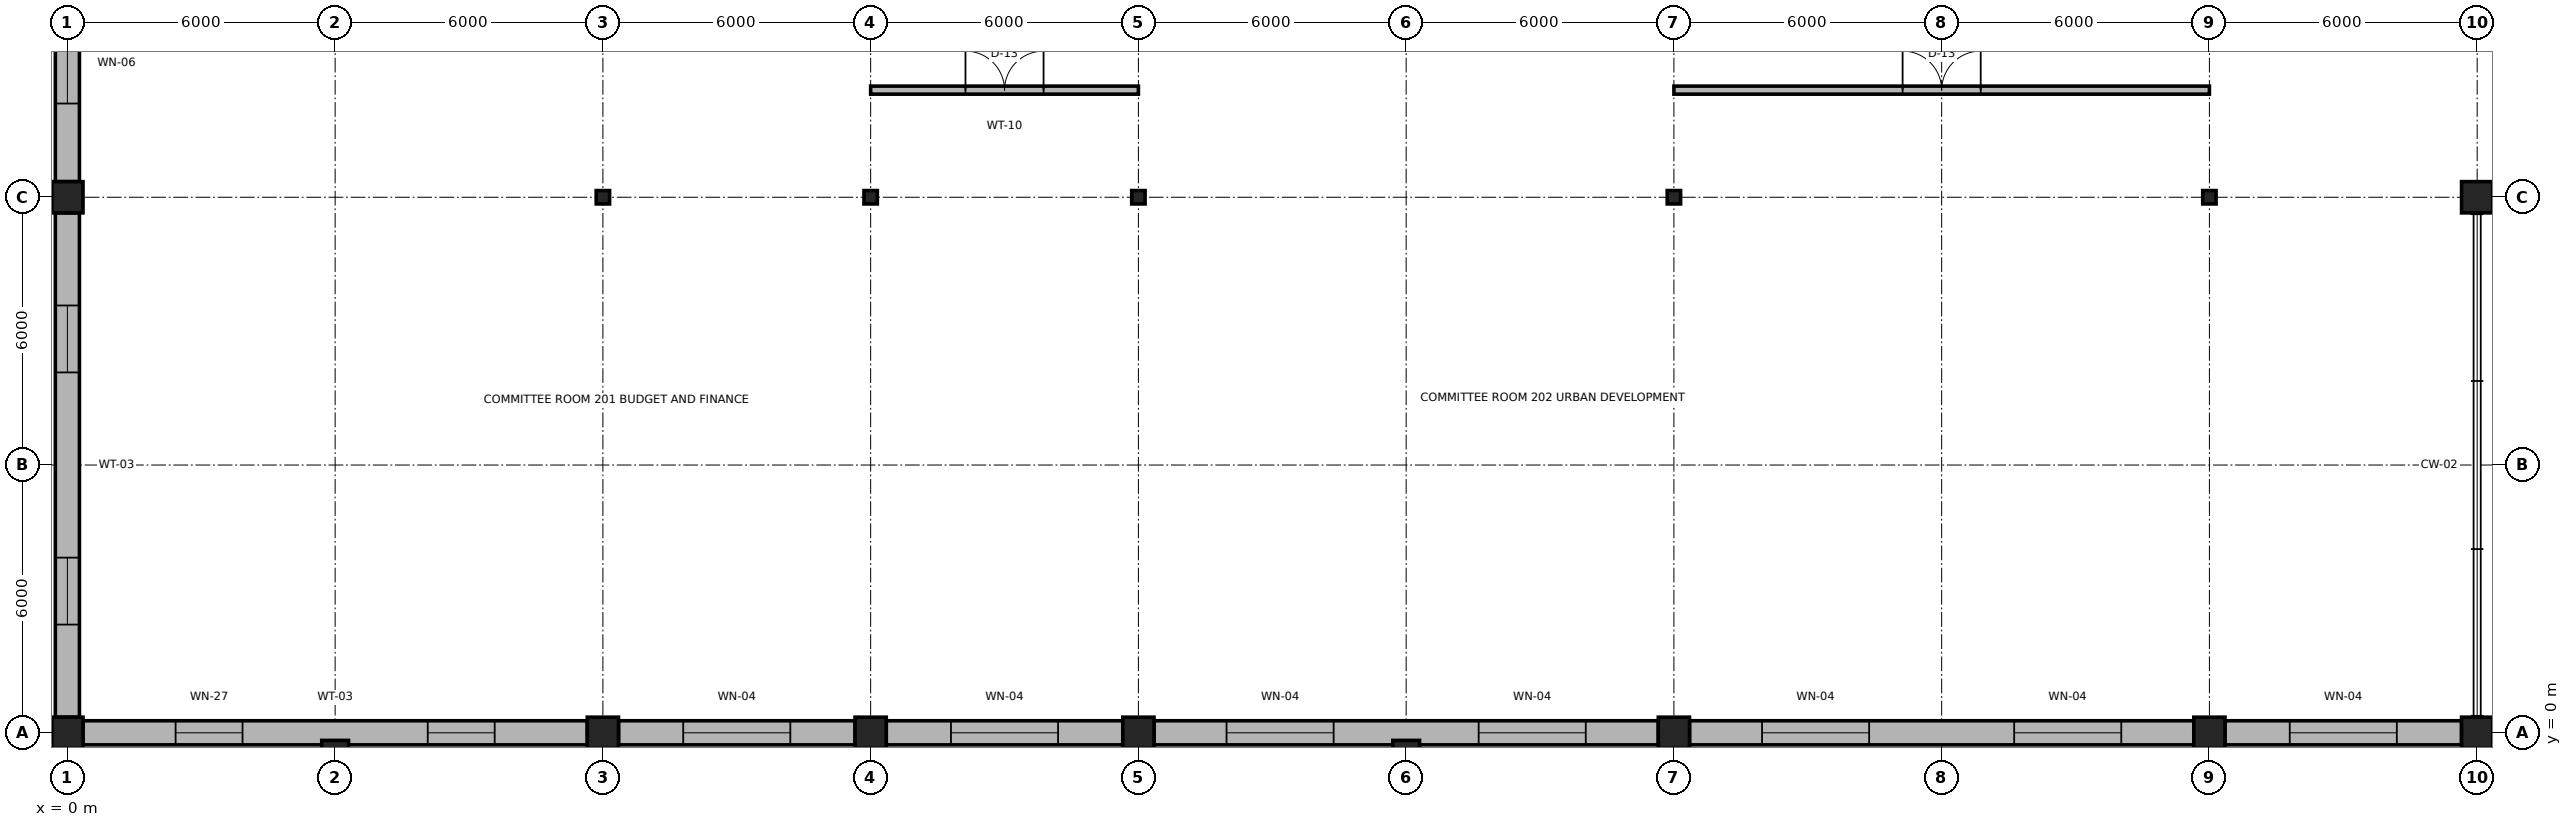
"""IFC4 building model, lengths in metres.
Left out: names, types, materials, properties, quantities, classifications, styles, units other than length and angle.
Written with IfcOpenShell. Run it as: python <this file> out.ifc"""

import sys

from ifc_helpers import new_model, si_unit, direction, frame, frame_2d, origin, origin_2d, place, context, subcontext, project, spatial, rectangle, i_section, extrude, element, fill, save


model = new_model("IFC4")
c1 = context("Model", 3, precision=1e-05, world=origin(), true_north=direction((0.0, 1.0)))
c2 = subcontext(c1, "Body", "Model", "MODEL_VIEW")
j1 = project(units=[si_unit("LENGTHUNIT", "METRE"), si_unit("PLANEANGLEUNIT", "RADIAN")], contexts=[c1])
p1 = place(None, origin())
s1 = spatial("IfcSite", under=j1, at=p1, CompositionType="ELEMENT")
p2 = place(p1, origin())
s2 = spatial("IfcBuilding", under=s1, at=p2, CompositionType="ELEMENT")
p3 = place(p2, frame((0.0, 0.0, 6.0)))
s3 = spatial("IfcBuildingStorey", under=s2, at=p3, CompositionType="ELEMENT", Elevation=6.0)
for number, where, z_axis, x_axis in (
    (1, (0.0, 0.0, 0.0), (0.0, 0.0, 1.0), (1.0, 0.0, 0.0)),
    (2, (12.0, 0.0, 0.0), (0.0, 0.0, 1.0), (1.0, 0.0, 0.0)),
    (3, (18.0, 0.0, 0.0), (0.0, 0.0, 1.0), (1.0, 0.0, 0.0)),
    (4, (24.0, 0.0, 0.0), (0.0, 0.0, 1.0), (1.0, 0.0, 0.0)),
    (5, (36.0, 0.0, 0.0), (0.0, 0.0, 1.0), (1.0, 0.0, 0.0)),
    (6, (48.0, 0.0, 0.0), (0.0, 0.0, 1.0), (1.0, 0.0, 0.0)),
    (7, (54.0, 0.0, 0.0), (0.0, 0.0, 1.0), (1.0, 0.0, 0.0)),
    (8, (0.0, 12.0, 0.0), (0.0, 0.0, 1.0), (1.0, 0.0, 0.0)),
):
    element("IfcColumn", number, at=place(p3, frame(where, z_axis=z_axis, x_axis=x_axis)), inside=s3, PredefinedType="COLUMN", context=c2, shape_type="SweptSolid", body=[
        extrude(rectangle(XDim=0.7, YDim=0.7, at=origin_2d()), origin(), (0.0, 0.0, 1.0), 6.0),
    ])
for number, where, z_axis, x_axis in (
    (9, (12.0, 12.0, 0.0), (0.0, 0.0, 1.0), (1.0, 0.0, 0.0)),
    (10, (18.0, 12.0, 0.0), (0.0, 0.0, 1.0), (1.0, 0.0, 0.0)),
    (11, (24.0, 12.0, 0.0), (0.0, 0.0, 1.0), (1.0, 0.0, 0.0)),
    (12, (36.0, 12.0, 0.0), (0.0, 0.0, 1.0), (1.0, 0.0, 0.0)),
    (13, (48.0, 12.0, 0.0), (0.0, 0.0, 1.0), (1.0, 0.0, 0.0)),
):
    element("IfcColumn", number, at=place(p3, frame(where, z_axis=z_axis, x_axis=x_axis)), inside=s3, PredefinedType="COLUMN", context=c2, shape_type="SweptSolid", body=[
        extrude(i_section(OverallWidth=0.3, OverallDepth=0.3, WebThickness=0.01, FlangeThickness=0.015, FilletRadius=0.018, at=origin_2d()), origin(), (0.0, 0.0, 1.0), 6.0),
    ])
p4 = place(p3, frame((54.0, 12.0, 0.0), z_axis=(0.0, 0.0, 1.0), x_axis=(1.0, 0.0, 0.0)))
e14 = element("IfcColumn", 14, at=p4, inside=s3, PredefinedType="COLUMN", context=c2, shape_type="SweptSolid", body=[
    extrude(rectangle(XDim=0.7, YDim=0.7, at=origin_2d()), origin(), (0.0, 0.0, 1.0), 6.0),
])
for number, where, z_axis, x_axis in (
    (15, (6.0, -0.35, 0.0), (0.0, 0.0, 1.0), (1.0, 0.0, 0.0)),
    (16, (30.0, -0.35, 0.0), (0.0, 0.0, 1.0), (1.0, 0.0, 0.0)),
):
    element("IfcColumn", number, at=place(p3, frame(where, z_axis=z_axis, x_axis=x_axis)), inside=s3, PredefinedType="PILASTER", context=c2, shape_type="SweptSolid", body=[
        extrude(rectangle(XDim=0.6, YDim=0.36, at=origin_2d()), origin(), (0.0, 0.0, 1.0), 6.0),
    ])
p5 = place(p3, frame((0.35, 0.0, 0.0), z_axis=(0.0, 0.0, 1.0), x_axis=(1.0, 0.0, 0.0)))
e17 = element("IfcWall", 17, at=p5, inside=s3, PredefinedType="SOLIDWALL", context=c2, shape_type="SweptSolid", body=[
    extrude(rectangle(XDim=11.3, YDim=0.54, at=frame_2d((5.65, 0.0))), origin(), (0.0, 0.0, 1.0), 5.31),
])
p6 = place(p5, frame((2.075, 0.0, 0.85)))
e18 = element("IfcOpeningElement", 18, at=p6, cuts=e17, PredefinedType="OPENING", context=c2, shape_type="SweptSolid", body=[
    extrude(rectangle(XDim=1.5, YDim=2.8, at=frame_2d((0.75, 1.4))), frame((0.0, 0.285, 0.0), z_axis=(0.0, -1.0, 0.0), x_axis=(1.0, 0.0, 0.0)), (0.0, 0.0, 1.0), 0.57),
])
p7 = place(p5, frame((7.725, 0.0, 0.85)))
e19 = element("IfcOpeningElement", 19, at=p7, cuts=e17, PredefinedType="OPENING", context=c2, shape_type="SweptSolid", body=[
    extrude(rectangle(XDim=1.5, YDim=2.8, at=frame_2d((0.75, 1.4))), frame((0.0, 0.285, 0.0), z_axis=(0.0, -1.0, 0.0), x_axis=(1.0, 0.0, 0.0)), (0.0, 0.0, 1.0), 0.57),
])
p8 = place(p3, frame((12.35, 0.0, 0.0), z_axis=(0.0, 0.0, 1.0), x_axis=(1.0, 0.0, 0.0)))
e20 = element("IfcWall", 20, at=p8, inside=s3, PredefinedType="SOLIDWALL", context=c2, shape_type="SweptSolid", body=[
    extrude(rectangle(XDim=5.3, YDim=0.54, at=frame_2d((2.65, 0.0))), origin(), (0.0, 0.0, 1.0), 5.31),
])
p9 = place(p8, frame((1.45, 0.0, 0.85)))
e21 = element("IfcOpeningElement", 21, at=p9, cuts=e20, PredefinedType="OPENING", context=c2, shape_type="SweptSolid", body=[
    extrude(rectangle(XDim=2.4, YDim=3.8, at=frame_2d((1.2, 1.9))), frame((0.0, 0.285, 0.0), z_axis=(0.0, -1.0, 0.0), x_axis=(1.0, 0.0, 0.0)), (0.0, 0.0, 1.0), 0.57),
])
p10 = place(p3, frame((18.35, 0.0, 0.0), z_axis=(0.0, 0.0, 1.0), x_axis=(1.0, 0.0, 0.0)))
e22 = element("IfcWall", 22, at=p10, inside=s3, PredefinedType="SOLIDWALL", context=c2, shape_type="SweptSolid", body=[
    extrude(rectangle(XDim=5.3, YDim=0.54, at=frame_2d((2.65, 0.0))), origin(), (0.0, 0.0, 1.0), 5.31),
])
p11 = place(p10, frame((1.45, 0.0, 0.85)))
e23 = element("IfcOpeningElement", 23, at=p11, cuts=e22, PredefinedType="OPENING", context=c2, shape_type="SweptSolid", body=[
    extrude(rectangle(XDim=2.4, YDim=3.8, at=frame_2d((1.2, 1.9))), frame((0.0, 0.285, 0.0), z_axis=(0.0, -1.0, 0.0), x_axis=(1.0, 0.0, 0.0)), (0.0, 0.0, 1.0), 0.57),
])
p12 = place(p3, frame((24.35, 0.0, 0.0), z_axis=(0.0, 0.0, 1.0), x_axis=(1.0, 0.0, 0.0)))
e24 = element("IfcWall", 24, at=p12, inside=s3, PredefinedType="SOLIDWALL", context=c2, shape_type="SweptSolid", body=[
    extrude(rectangle(XDim=11.3, YDim=0.54, at=frame_2d((5.65, 0.0))), origin(), (0.0, 0.0, 1.0), 5.31),
])
p13 = place(p12, frame((1.625, 0.0, 0.85)))
e25 = element("IfcOpeningElement", 25, at=p13, cuts=e24, PredefinedType="OPENING", context=c2, shape_type="SweptSolid", body=[
    extrude(rectangle(XDim=2.4, YDim=3.8, at=frame_2d((1.2, 1.9))), frame((0.0, 0.285, 0.0), z_axis=(0.0, -1.0, 0.0), x_axis=(1.0, 0.0, 0.0)), (0.0, 0.0, 1.0), 0.57),
])
p14 = place(p12, frame((7.275, 0.0, 0.85)))
e26 = element("IfcOpeningElement", 26, at=p14, cuts=e24, PredefinedType="OPENING", context=c2, shape_type="SweptSolid", body=[
    extrude(rectangle(XDim=2.4, YDim=3.8, at=frame_2d((1.2, 1.9))), frame((0.0, 0.285, 0.0), z_axis=(0.0, -1.0, 0.0), x_axis=(1.0, 0.0, 0.0)), (0.0, 0.0, 1.0), 0.57),
])
p15 = place(p3, frame((36.35, 0.0, 0.0), z_axis=(0.0, 0.0, 1.0), x_axis=(1.0, 0.0, 0.0)))
e27 = element("IfcWall", 27, at=p15, inside=s3, PredefinedType="SOLIDWALL", context=c2, shape_type="SweptSolid", body=[
    extrude(rectangle(XDim=11.3, YDim=0.54, at=frame_2d((5.65, 0.0))), origin(), (0.0, 0.0, 1.0), 5.31),
])
p16 = place(p15, frame((1.625, 0.0, 0.85)))
e28 = element("IfcOpeningElement", 28, at=p16, cuts=e27, PredefinedType="OPENING", context=c2, shape_type="SweptSolid", body=[
    extrude(rectangle(XDim=2.4, YDim=3.8, at=frame_2d((1.2, 1.9))), frame((0.0, 0.285, 0.0), z_axis=(0.0, -1.0, 0.0), x_axis=(1.0, 0.0, 0.0)), (0.0, 0.0, 1.0), 0.57),
])
p17 = place(p15, frame((7.275, 0.0, 0.85)))
e29 = element("IfcOpeningElement", 29, at=p17, cuts=e27, PredefinedType="OPENING", context=c2, shape_type="SweptSolid", body=[
    extrude(rectangle(XDim=2.4, YDim=3.8, at=frame_2d((1.2, 1.9))), frame((0.0, 0.285, 0.0), z_axis=(0.0, -1.0, 0.0), x_axis=(1.0, 0.0, 0.0)), (0.0, 0.0, 1.0), 0.57),
])
p18 = place(p3, frame((48.35, 0.0, 0.0), z_axis=(0.0, 0.0, 1.0), x_axis=(1.0, 0.0, 0.0)))
e30 = element("IfcWall", 30, at=p18, inside=s3, PredefinedType="SOLIDWALL", context=c2, shape_type="SweptSolid", body=[
    extrude(rectangle(XDim=5.3, YDim=0.54, at=frame_2d((2.65, 0.0))), origin(), (0.0, 0.0, 1.0), 5.31),
])
p19 = place(p18, frame((1.45, 0.0, 0.85)))
e31 = element("IfcOpeningElement", 31, at=p19, cuts=e30, PredefinedType="OPENING", context=c2, shape_type="SweptSolid", body=[
    extrude(rectangle(XDim=2.4, YDim=3.8, at=frame_2d((1.2, 1.9))), frame((0.0, 0.285, 0.0), z_axis=(0.0, -1.0, 0.0), x_axis=(1.0, 0.0, 0.0)), (0.0, 0.0, 1.0), 0.57),
])
p20 = place(p3, frame((0.0, 0.35, 0.0), z_axis=(0.0, 0.0, 1.0), x_axis=(0.0, 1.0, 0.0)))
e32 = element("IfcWall", 32, at=p20, inside=s3, PredefinedType="SOLIDWALL", context=c2, shape_type="SweptSolid", body=[
    extrude(rectangle(XDim=11.3, YDim=0.54, at=frame_2d((5.65, 0.0))), origin(), (0.0, 0.0, 1.0), 5.31),
])
p21 = place(p20, frame((2.075, 0.0, 0.85)))
e33 = element("IfcOpeningElement", 33, at=p21, cuts=e32, PredefinedType="OPENING", context=c2, shape_type="SweptSolid", body=[
    extrude(rectangle(XDim=1.5, YDim=2.8, at=frame_2d((0.75, 1.4))), frame((0.0, 0.285, 0.0), z_axis=(0.0, -1.0, 0.0), x_axis=(1.0, 0.0, 0.0)), (0.0, 0.0, 1.0), 0.57),
])
p22 = place(p20, frame((7.725, 0.0, 0.85)))
e34 = element("IfcOpeningElement", 34, at=p22, cuts=e32, PredefinedType="OPENING", context=c2, shape_type="SweptSolid", body=[
    extrude(rectangle(XDim=1.5, YDim=2.8, at=frame_2d((0.75, 1.4))), frame((0.0, 0.285, 0.0), z_axis=(0.0, -1.0, 0.0), x_axis=(1.0, 0.0, 0.0)), (0.0, 0.0, 1.0), 0.57),
])
p23 = place(p3, frame((0.0, 12.35, 0.0), z_axis=(0.0, 0.0, 1.0), x_axis=(0.0, 1.0, 0.0)))
e35 = element("IfcWall", 35, at=p23, inside=s3, PredefinedType="SOLIDWALL", context=c2, shape_type="SweptSolid", body=[
    extrude(rectangle(XDim=5.3, YDim=0.54, at=frame_2d((2.65, 0.0))), origin(), (0.0, 0.0, 1.0), 5.31),
])
p24 = place(p23, frame((1.75, 0.0, 0.85)))
e36 = element("IfcOpeningElement", 36, at=p24, cuts=e35, PredefinedType="OPENING", context=c2, shape_type="SweptSolid", body=[
    extrude(rectangle(XDim=1.8, YDim=3.3, at=frame_2d((0.9, 1.65))), frame((0.0, 0.285, 0.0), z_axis=(0.0, -1.0, 0.0), x_axis=(1.0, 0.0, 0.0)), (0.0, 0.0, 1.0), 0.57),
])
p25 = place(p3, frame((18.0, 14.4, 0.0), z_axis=(0.0, 0.0, 1.0), x_axis=(1.0, 0.0, 0.0)))
e37 = element("IfcWall", 37, at=p25, inside=s3, PredefinedType="PARTITIONING", context=c2, shape_type="SweptSolid", body=[
    extrude(rectangle(XDim=6.0, YDim=0.18, at=frame_2d((3.0, 0.0))), origin(), (0.0, 0.0, 1.0), 5.76),
])
p26 = place(p25, frame((2.125, 0.0, 0.0)))
e38 = element("IfcOpeningElement", 38, at=p26, cuts=e37, PredefinedType="OPENING", context=c2, shape_type="SweptSolid", body=[
    extrude(rectangle(XDim=1.75, YDim=2.55, at=frame_2d((0.875, 1.275))), frame((0.0, 0.105, 0.0), z_axis=(0.0, -1.0, 0.0), x_axis=(1.0, 0.0, 0.0)), (0.0, 0.0, 1.0), 0.21),
])
p27 = place(p3, frame((36.0, 14.4, 0.0), z_axis=(0.0, 0.0, 1.0), x_axis=(1.0, 0.0, 0.0)))
e39 = element("IfcWall", 39, at=p27, inside=s3, PredefinedType="PARTITIONING", context=c2, shape_type="SweptSolid", body=[
    extrude(rectangle(XDim=12.0, YDim=0.18, at=frame_2d((6.0, 0.0))), origin(), (0.0, 0.0, 1.0), 5.76),
])
p28 = place(p27, frame((5.125, 0.0, 0.0)))
e40 = element("IfcOpeningElement", 40, at=p28, cuts=e39, PredefinedType="OPENING", context=c2, shape_type="SweptSolid", body=[
    extrude(rectangle(XDim=1.75, YDim=2.55, at=frame_2d((0.875, 1.275))), frame((0.0, 0.105, 0.0), z_axis=(0.0, -1.0, 0.0), x_axis=(1.0, 0.0, 0.0)), (0.0, 0.0, 1.0), 0.21),
])
p29 = place(p6, origin())
e41 = element("IfcWindow", 41, at=p29, inside=s3, PartitioningType="SINGLE_PANEL", PredefinedType="WINDOW", context=c2, shape_type="SweptSolid", body=[
    extrude(rectangle(XDim=1.5, YDim=2.8, at=frame_2d((0.75, 1.4))), frame((0.0, 0.03, 0.0), z_axis=(0.0, -1.0, 0.0), x_axis=(1.0, 0.0, 0.0)), (0.0, 0.0, 1.0), 0.06),
])
fill(e18, e41)
p30 = place(p7, origin())
e42 = element("IfcWindow", 42, at=p30, inside=s3, PartitioningType="SINGLE_PANEL", PredefinedType="WINDOW", context=c2, shape_type="SweptSolid", body=[
    extrude(rectangle(XDim=1.5, YDim=2.8, at=frame_2d((0.75, 1.4))), frame((0.0, 0.03, 0.0), z_axis=(0.0, -1.0, 0.0), x_axis=(1.0, 0.0, 0.0)), (0.0, 0.0, 1.0), 0.06),
])
fill(e19, e42)
p31 = place(p9, origin())
e43 = element("IfcWindow", 43, at=p31, inside=s3, PartitioningType="SINGLE_PANEL", PredefinedType="WINDOW", context=c2, shape_type="SweptSolid", body=[
    extrude(rectangle(XDim=2.4, YDim=3.8, at=frame_2d((1.2, 1.9))), frame((0.0, 0.03, 0.0), z_axis=(0.0, -1.0, 0.0), x_axis=(1.0, 0.0, 0.0)), (0.0, 0.0, 1.0), 0.06),
])
fill(e21, e43)
p32 = place(p11, origin())
e44 = element("IfcWindow", 44, at=p32, inside=s3, PartitioningType="SINGLE_PANEL", PredefinedType="WINDOW", context=c2, shape_type="SweptSolid", body=[
    extrude(rectangle(XDim=2.4, YDim=3.8, at=frame_2d((1.2, 1.9))), frame((0.0, 0.03, 0.0), z_axis=(0.0, -1.0, 0.0), x_axis=(1.0, 0.0, 0.0)), (0.0, 0.0, 1.0), 0.06),
])
fill(e23, e44)
p33 = place(p13, origin())
e45 = element("IfcWindow", 45, at=p33, inside=s3, PartitioningType="SINGLE_PANEL", PredefinedType="WINDOW", context=c2, shape_type="SweptSolid", body=[
    extrude(rectangle(XDim=2.4, YDim=3.8, at=frame_2d((1.2, 1.9))), frame((0.0, 0.03, 0.0), z_axis=(0.0, -1.0, 0.0), x_axis=(1.0, 0.0, 0.0)), (0.0, 0.0, 1.0), 0.06),
])
fill(e25, e45)
p34 = place(p14, origin())
e46 = element("IfcWindow", 46, at=p34, inside=s3, PartitioningType="SINGLE_PANEL", PredefinedType="WINDOW", context=c2, shape_type="SweptSolid", body=[
    extrude(rectangle(XDim=2.4, YDim=3.8, at=frame_2d((1.2, 1.9))), frame((0.0, 0.03, 0.0), z_axis=(0.0, -1.0, 0.0), x_axis=(1.0, 0.0, 0.0)), (0.0, 0.0, 1.0), 0.06),
])
fill(e26, e46)
p35 = place(p16, origin())
e47 = element("IfcWindow", 47, at=p35, inside=s3, PartitioningType="SINGLE_PANEL", PredefinedType="WINDOW", context=c2, shape_type="SweptSolid", body=[
    extrude(rectangle(XDim=2.4, YDim=3.8, at=frame_2d((1.2, 1.9))), frame((0.0, 0.03, 0.0), z_axis=(0.0, -1.0, 0.0), x_axis=(1.0, 0.0, 0.0)), (0.0, 0.0, 1.0), 0.06),
])
fill(e28, e47)
p36 = place(p17, origin())
e48 = element("IfcWindow", 48, at=p36, inside=s3, PartitioningType="SINGLE_PANEL", PredefinedType="WINDOW", context=c2, shape_type="SweptSolid", body=[
    extrude(rectangle(XDim=2.4, YDim=3.8, at=frame_2d((1.2, 1.9))), frame((0.0, 0.03, 0.0), z_axis=(0.0, -1.0, 0.0), x_axis=(1.0, 0.0, 0.0)), (0.0, 0.0, 1.0), 0.06),
])
fill(e29, e48)
p37 = place(p19, origin())
e49 = element("IfcWindow", 49, at=p37, inside=s3, PartitioningType="SINGLE_PANEL", PredefinedType="WINDOW", context=c2, shape_type="SweptSolid", body=[
    extrude(rectangle(XDim=2.4, YDim=3.8, at=frame_2d((1.2, 1.9))), frame((0.0, 0.03, 0.0), z_axis=(0.0, -1.0, 0.0), x_axis=(1.0, 0.0, 0.0)), (0.0, 0.0, 1.0), 0.06),
])
fill(e31, e49)
p38 = place(p21, origin())
e50 = element("IfcWindow", 50, at=p38, inside=s3, PartitioningType="SINGLE_PANEL", PredefinedType="WINDOW", context=c2, shape_type="SweptSolid", body=[
    extrude(rectangle(XDim=1.5, YDim=2.8, at=frame_2d((0.75, 1.4))), frame((0.0, 0.03, 0.0), z_axis=(0.0, -1.0, 0.0), x_axis=(1.0, 0.0, 0.0)), (0.0, 0.0, 1.0), 0.06),
])
fill(e33, e50)
p39 = place(p22, origin())
e51 = element("IfcWindow", 51, at=p39, inside=s3, PartitioningType="SINGLE_PANEL", PredefinedType="WINDOW", context=c2, shape_type="SweptSolid", body=[
    extrude(rectangle(XDim=1.5, YDim=2.8, at=frame_2d((0.75, 1.4))), frame((0.0, 0.03, 0.0), z_axis=(0.0, -1.0, 0.0), x_axis=(1.0, 0.0, 0.0)), (0.0, 0.0, 1.0), 0.06),
])
fill(e34, e51)
p40 = place(p24, origin())
e52 = element("IfcWindow", 52, at=p40, inside=s3, PartitioningType="SINGLE_PANEL", PredefinedType="WINDOW", context=c2, shape_type="SweptSolid", body=[
    extrude(rectangle(XDim=1.8, YDim=3.3, at=frame_2d((0.9, 1.65))), frame((0.0, 0.03, 0.0), z_axis=(0.0, -1.0, 0.0), x_axis=(1.0, 0.0, 0.0)), (0.0, 0.0, 1.0), 0.06),
])
fill(e36, e52)
p41 = place(p26, origin())
e53 = element("IfcDoor", 53, at=p41, inside=s3, OperationType="DOUBLE_DOOR_SINGLE_SWING", PredefinedType="DOOR", context=c2, shape_type="SweptSolid", body=[
    extrude(rectangle(XDim=1.75, YDim=2.55, at=frame_2d((0.875, 1.275))), frame((0.0, 0.025, 0.0), z_axis=(0.0, -1.0, 0.0), x_axis=(1.0, 0.0, 0.0)), (0.0, 0.0, 1.0), 0.05),
])
fill(e38, e53)
p42 = place(p28, origin())
e54 = element("IfcDoor", 54, at=p42, inside=s3, OperationType="DOUBLE_DOOR_SINGLE_SWING", PredefinedType="DOOR", context=c2, shape_type="SweptSolid", body=[
    extrude(rectangle(XDim=1.75, YDim=2.55, at=frame_2d((0.875, 1.275))), frame((0.0, 0.025, 0.0), z_axis=(0.0, -1.0, 0.0), x_axis=(1.0, 0.0, 0.0)), (0.0, 0.0, 1.0), 0.05),
])
fill(e40, e54)
save(model, sys.argv[1])
